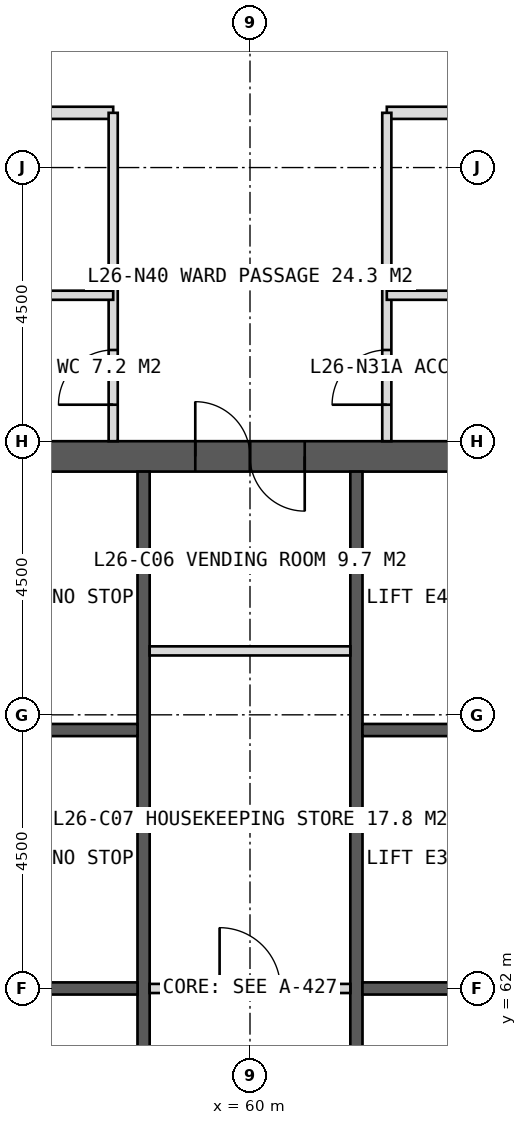
"""IFC4 building model, lengths in metres.
Left out: names, types, materials, properties, quantities, classifications, styles, units other than length and angle.
Written with IfcOpenShell. Run it as: python <this file> out.ifc"""

import sys

from ifc_helpers import new_model, si_unit, direction, frame, frame_2d, origin, place, context, subcontext, project, spatial, rectangle, extrude, element, fill, save


model = new_model("IFC4")
c1 = context("Model", 3, precision=1e-05, world=origin(), true_north=direction((0.0, 1.0)))
c2 = subcontext(c1, "Body", "Model", "MODEL_VIEW")
j1 = project(units=[si_unit("LENGTHUNIT", "METRE"), si_unit("PLANEANGLEUNIT", "RADIAN")], contexts=[c1])
p1 = place(None, origin())
s1 = spatial("IfcSite", under=j1, at=p1, CompositionType="ELEMENT")
p2 = place(p1, origin())
s2 = spatial("IfcBuilding", under=s1, at=p2, CompositionType="ELEMENT")
p3 = place(p2, frame((0.0, 0.0, 112.0)))
s3 = spatial("IfcBuildingStorey", under=s2, at=p3, CompositionType="ELEMENT", Elevation=112.0)
p4 = place(p3, frame((51.0, 70.75, 0.0), z_axis=(0.0, 0.0, 1.0), x_axis=(1.0, 0.0, 0.0)))
e1 = element("IfcWall", 1, at=p4, inside=s3, PredefinedType="SHEAR", context=c2, shape_type="SweptSolid", body=[
    extrude(rectangle(XDim=18.0, YDim=0.5, at=frame_2d((9.0, 0.0))), origin(), (0.0, 0.0, 1.0), 4.0),
])
p5 = place(p4, frame((8.1, 0.0, 0.0)))
e2 = element("IfcOpeningElement", 2, at=p5, cuts=e1, PredefinedType="OPENING", context=c2, shape_type="SweptSolid", body=[
    extrude(rectangle(XDim=1.8, YDim=2.2, at=frame_2d((0.9, 1.1))), frame((0.0, 0.26, 0.0), z_axis=(0.0, -1.0, 0.0), x_axis=(1.0, 0.0, 0.0)), (0.0, 0.0, 1.0), 0.52),
])
p6 = place(p3, frame((58.25, 53.5, 0.0), z_axis=(0.0, 0.0, 1.0), x_axis=(0.0, 1.0, 0.0)))
e3 = element("IfcWall", 3, at=p6, inside=s3, PredefinedType="SHEAR", context=c2, shape_type="SweptSolid", body=[
    extrude(rectangle(XDim=17.0, YDim=0.2, at=frame_2d((8.5, 0.0))), origin(), (0.0, 0.0, 1.0), 4.0),
])
p7 = place(p6, frame((1.375, 0.0, 0.0)))
e4 = element("IfcOpeningElement", 4, at=p7, cuts=e3, PredefinedType="OPENING", context=c2, shape_type="SweptSolid", body=[
    extrude(rectangle(XDim=1.4, YDim=2.2, at=frame_2d((0.7, 1.1))), frame((0.0, 0.11, 0.0), z_axis=(0.0, -1.0, 0.0), x_axis=(1.0, 0.0, 0.0)), (0.0, 0.0, 1.0), 0.22),
])
p8 = place(p6, frame((5.675, 0.0, 0.0)))
e5 = element("IfcOpeningElement", 5, at=p8, cuts=e3, PredefinedType="OPENING", context=c2, shape_type="SweptSolid", body=[
    extrude(rectangle(XDim=1.4, YDim=2.2, at=frame_2d((0.7, 1.1))), frame((0.0, 0.11, 0.0), z_axis=(0.0, -1.0, 0.0), x_axis=(1.0, 0.0, 0.0)), (0.0, 0.0, 1.0), 0.22),
])
p9 = place(p3, frame((61.75, 53.5, 0.0), z_axis=(0.0, 0.0, 1.0), x_axis=(0.0, 1.0, 0.0)))
e6 = element("IfcWall", 6, at=p9, inside=s3, PredefinedType="SHEAR", context=c2, shape_type="SweptSolid", body=[
    extrude(rectangle(XDim=17.0, YDim=0.2, at=frame_2d((8.5, 0.0))), origin(), (0.0, 0.0, 1.0), 4.0),
])
p10 = place(p9, frame((1.375, 0.0, 0.0)))
e7 = element("IfcOpeningElement", 7, at=p10, cuts=e6, PredefinedType="OPENING", context=c2, shape_type="SweptSolid", body=[
    extrude(rectangle(XDim=1.4, YDim=2.2, at=frame_2d((0.7, 1.1))), frame((0.0, 0.11, 0.0), z_axis=(0.0, -1.0, 0.0), x_axis=(1.0, 0.0, 0.0)), (0.0, 0.0, 1.0), 0.22),
])
p11 = place(p9, frame((5.675, 0.0, 0.0)))
e8 = element("IfcOpeningElement", 8, at=p11, cuts=e6, PredefinedType="OPENING", context=c2, shape_type="SweptSolid", body=[
    extrude(rectangle(XDim=1.4, YDim=2.2, at=frame_2d((0.7, 1.1))), frame((0.0, 0.11, 0.0), z_axis=(0.0, -1.0, 0.0), x_axis=(1.0, 0.0, 0.0)), (0.0, 0.0, 1.0), 0.22),
])
for number, where, z_axis, x_axis in (
    (9, (55.1, 62.0, 0.0), (0.0, 0.0, 1.0), (1.0, 0.0, 0.0)),
    (10, (61.85, 62.0, 0.0), (0.0, 0.0, 1.0), (1.0, 0.0, 0.0)),
    (11, (55.1, 66.25, 0.0), (0.0, 0.0, 1.0), (1.0, 0.0, 0.0)),
    (12, (61.85, 66.25, 0.0), (0.0, 0.0, 1.0), (1.0, 0.0, 0.0)),
):
    element("IfcWall", number, at=place(p3, frame(where, z_axis=z_axis, x_axis=x_axis)), inside=s3, PredefinedType="SHEAR", context=c2, shape_type="SweptSolid", body=[
        extrude(rectangle(XDim=3.05, YDim=0.2, at=frame_2d((1.525, 0.0))), origin(), (0.0, 0.0, 1.0), 4.0),
    ])
p12 = place(p3, frame((45.6, 76.4, 0.0), z_axis=(0.0, 0.0, 1.0), x_axis=(1.0, 0.0, 0.0)))
e13 = element("IfcWall", 13, at=p12, inside=s3, PredefinedType="PARTITIONING", context=c2, shape_type="SweptSolid", body=[
    extrude(rectangle(XDim=12.15, YDim=0.2, at=frame_2d((6.075, 0.0))), origin(), (0.0, 0.0, 1.0), 3.75),
])
p13 = place(p12, frame((6.85, 0.0, 0.0)))
e14 = element("IfcOpeningElement", 14, at=p13, cuts=e13, PredefinedType="OPENING", context=c2, shape_type="SweptSolid", body=[
    extrude(rectangle(XDim=1.0, YDim=2.1, at=frame_2d((0.5, 1.05))), frame((0.0, 0.11, 0.0), z_axis=(0.0, -1.0, 0.0), x_axis=(1.0, 0.0, 0.0)), (0.0, 0.0, 1.0), 0.22),
])
p14 = place(p3, frame((62.25, 76.4, 0.0), z_axis=(0.0, 0.0, 1.0), x_axis=(1.0, 0.0, 0.0)))
e15 = element("IfcWall", 15, at=p14, inside=s3, PredefinedType="PARTITIONING", context=c2, shape_type="SweptSolid", body=[
    extrude(rectangle(XDim=6.75, YDim=0.2, at=frame_2d((3.375, 0.0))), origin(), (0.0, 0.0, 1.0), 3.75),
])
p15 = place(p14, frame((3.55, 0.0, 0.0)))
e16 = element("IfcOpeningElement", 16, at=p15, cuts=e15, PredefinedType="OPENING", context=c2, shape_type="SweptSolid", body=[
    extrude(rectangle(XDim=1.0, YDim=2.1, at=frame_2d((0.5, 1.05))), frame((0.0, 0.11, 0.0), z_axis=(0.0, -1.0, 0.0), x_axis=(1.0, 0.0, 0.0)), (0.0, 0.0, 1.0), 0.22),
])
p16 = place(p3, frame((57.75, 71.0, 0.0), z_axis=(0.0, 0.0, 1.0), x_axis=(0.0, 1.0, 0.0)))
e17 = element("IfcWall", 17, at=p16, inside=s3, PredefinedType="PARTITIONING", context=c2, shape_type="SweptSolid", body=[
    extrude(rectangle(XDim=5.4, YDim=0.15, at=frame_2d((2.7, 0.0))), origin(), (0.0, 0.0, 1.0), 3.75),
])
p17 = place(p16, frame((0.6, 0.0, 0.0)))
e18 = element("IfcOpeningElement", 18, at=p17, cuts=e17, PredefinedType="OPENING", context=c2, shape_type="SweptSolid", body=[
    extrude(rectangle(XDim=0.9, YDim=2.1, at=frame_2d((0.45, 1.05))), frame((0.0, 0.085, 0.0), z_axis=(0.0, -1.0, 0.0), x_axis=(1.0, 0.0, 0.0)), (0.0, 0.0, 1.0), 0.17),
])
p18 = place(p3, frame((62.25, 71.0, 0.0), z_axis=(0.0, 0.0, 1.0), x_axis=(0.0, 1.0, 0.0)))
e19 = element("IfcWall", 19, at=p18, inside=s3, PredefinedType="PARTITIONING", context=c2, shape_type="SweptSolid", body=[
    extrude(rectangle(XDim=5.4, YDim=0.15, at=frame_2d((2.7, 0.0))), origin(), (0.0, 0.0, 1.0), 3.75),
])
p19 = place(p18, frame((0.6, 0.0, 0.0)))
e20 = element("IfcOpeningElement", 20, at=p19, cuts=e19, PredefinedType="OPENING", context=c2, shape_type="SweptSolid", body=[
    extrude(rectangle(XDim=0.9, YDim=2.1, at=frame_2d((0.45, 1.05))), frame((0.0, 0.085, 0.0), z_axis=(0.0, -1.0, 0.0), x_axis=(1.0, 0.0, 0.0)), (0.0, 0.0, 1.0), 0.17),
])
for number, where, z_axis, x_axis in (
    (21, (54.75, 73.4, 0.0), (0.0, 0.0, 1.0), (1.0, 0.0, 0.0)),
    (22, (62.25, 73.4, 0.0), (0.0, 0.0, 1.0), (1.0, 0.0, 0.0)),
):
    element("IfcWall", number, at=place(p3, frame(where, z_axis=z_axis, x_axis=x_axis)), inside=s3, PredefinedType="PARTITIONING", context=c2, shape_type="SweptSolid", body=[
        extrude(rectangle(XDim=3.0, YDim=0.15, at=frame_2d((1.5, 0.0))), origin(), (0.0, 0.0, 1.0), 3.75),
    ])
p20 = place(p3, frame((58.35, 62.0, 0.0), z_axis=(0.0, 0.0, 1.0), x_axis=(1.0, 0.0, 0.0)))
e23 = element("IfcWall", 23, at=p20, inside=s3, PredefinedType="PARTITIONING", context=c2, shape_type="SweptSolid", body=[
    extrude(rectangle(XDim=3.3, YDim=0.15, at=frame_2d((1.65, 0.0))), origin(), (0.0, 0.0, 1.0), 3.75),
])
p21 = place(p20, frame((1.15, 0.0, 0.0)))
e24 = element("IfcOpeningElement", 24, at=p21, cuts=e23, PredefinedType="OPENING", context=c2, shape_type="SweptSolid", body=[
    extrude(rectangle(XDim=1.0, YDim=2.1, at=frame_2d((0.5, 1.05))), frame((0.0, 0.085, 0.0), z_axis=(0.0, -1.0, 0.0), x_axis=(1.0, 0.0, 0.0)), (0.0, 0.0, 1.0), 0.17),
])
p22 = place(p3, frame((58.35, 67.551, 0.0), z_axis=(0.0, 0.0, 1.0), x_axis=(1.0, 0.0, 0.0)))
e25 = element("IfcWall", 25, at=p22, inside=s3, PredefinedType="PARTITIONING", context=c2, shape_type="SweptSolid", body=[
    extrude(rectangle(XDim=3.3, YDim=0.15, at=frame_2d((1.65, 0.0))), origin(), (0.0, 0.0, 1.0), 3.75),
])
p23 = place(p17, origin())
e26 = element("IfcDoor", 26, at=p23, inside=s3, OperationType="SINGLE_SWING_LEFT", PredefinedType="DOOR", context=c2, shape_type="SweptSolid", body=[
    extrude(rectangle(XDim=0.9, YDim=2.1, at=frame_2d((0.45, 1.05))), frame((0.0, 0.025, 0.0), z_axis=(0.0, -1.0, 0.0), x_axis=(1.0, 0.0, 0.0)), (0.0, 0.0, 1.0), 0.05),
])
fill(e18, e26)
p24 = place(p19, origin())
e27 = element("IfcDoor", 27, at=p24, inside=s3, OperationType="SINGLE_SWING_LEFT", PredefinedType="DOOR", context=c2, shape_type="SweptSolid", body=[
    extrude(rectangle(XDim=0.9, YDim=2.1, at=frame_2d((0.45, 1.05))), frame((0.0, 0.025, 0.0), z_axis=(0.0, -1.0, 0.0), x_axis=(1.0, 0.0, 0.0)), (0.0, 0.0, 1.0), 0.05),
])
fill(e20, e27)
p25 = place(p21, origin())
e28 = element("IfcDoor", 28, at=p25, inside=s3, OperationType="SINGLE_SWING_LEFT", PredefinedType="DOOR", context=c2, shape_type="SweptSolid", body=[
    extrude(rectangle(XDim=1.0, YDim=2.1, at=frame_2d((0.5, 1.05))), frame((0.0, 0.025, 0.0), z_axis=(0.0, -1.0, 0.0), x_axis=(1.0, 0.0, 0.0)), (0.0, 0.0, 1.0), 0.05),
])
fill(e24, e28)
p26 = place(p5, origin())
e29 = element("IfcDoor", 29, at=p26, inside=s3, OperationType="DOUBLE_DOOR_SINGLE_SWING", PredefinedType="DOOR", context=c2, shape_type="SweptSolid", body=[
    extrude(rectangle(XDim=1.8, YDim=2.2, at=frame_2d((0.9, 1.1))), frame((0.0, 0.025, 0.0), z_axis=(0.0, -1.0, 0.0), x_axis=(1.0, 0.0, 0.0)), (0.0, 0.0, 1.0), 0.05),
])
fill(e2, e29)
save(model, sys.argv[1])
